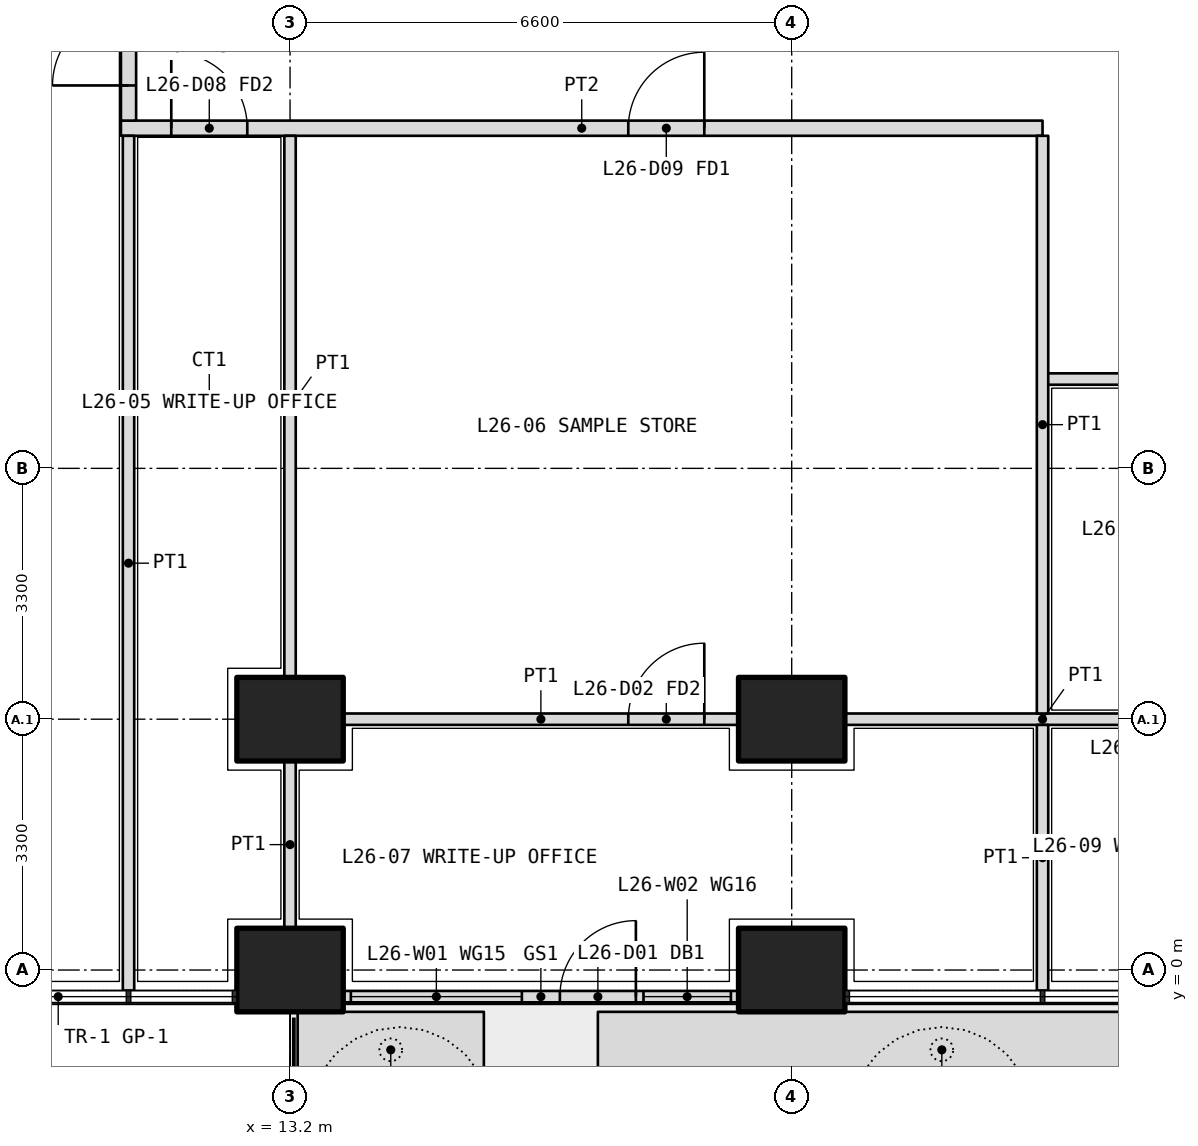
"""IFC4 building model, lengths in metres.
Left out: names, types, materials, properties, quantities, classifications, styles, units other than length and angle.
Written with IfcOpenShell. Run it as: python <this file> out.ifc"""

import sys

from ifc_helpers import new_model, si_unit, direction, frame, frame_2d, origin, origin_2d, place, context, subcontext, project, spatial, polyline, rectangle, outline, extrude, element, fill, save


model = new_model("IFC4")
c1 = context("Model", 3, precision=1e-05, world=origin(), true_north=direction((0.0, 1.0)))
c2 = subcontext(c1, "Body", "Model", "MODEL_VIEW")
j1 = project(units=[si_unit("LENGTHUNIT", "METRE"), si_unit("PLANEANGLEUNIT", "RADIAN")], contexts=[c1])
p1 = place(None, origin())
s1 = spatial("IfcSite", under=j1, at=p1, CompositionType="ELEMENT")
p2 = place(p1, origin())
s2 = spatial("IfcBuilding", under=s1, at=p2, CompositionType="ELEMENT")
p3 = place(p2, frame((0.0, 0.0, 115.8)))
s3 = spatial("IfcBuildingStorey", under=s2, at=p3, CompositionType="ELEMENT", Elevation=115.8)
for number, where, z_axis, x_axis in (
    (1, (13.2, 0.0, 0.0), (0.0, 0.0, 1.0), (1.0, 0.0, 0.0)),
    (2, (19.8, 0.0, 0.0), (0.0, 0.0, 1.0), (1.0, 0.0, 0.0)),
    (3, (13.2, 3.3, 0.0), (0.0, 0.0, 1.0), (1.0, 0.0, 0.0)),
    (4, (19.8, 3.3, 0.0), (0.0, 0.0, 1.0), (1.0, 0.0, 0.0)),
):
    element("IfcColumn", number, at=place(p3, frame(where, z_axis=z_axis, x_axis=x_axis)), inside=s3, PredefinedType="COLUMN", context=c2, shape_type="SweptSolid", body=[
        extrude(rectangle(XDim=1.4, YDim=1.1, at=origin_2d()), origin(), (0.0, 0.0, 1.0), 4.2),
    ])
p4 = place(p3, origin())
e5 = element("IfcWall", 5, at=p4, inside=s3, PredefinedType="USERDEFINED", context=c2, shape_type="SweptSolid", body=[
    extrude(outline(polyline([(13.3, -1.55), (15.75, -1.55), (15.75, -0.55), (13.3, -0.55), (13.3, -1.55)]), holes=[polyline([(13.45, -1.4), (15.6, -1.4), (15.6, -0.7), (13.45, -0.7), (13.45, -1.4)])]), origin(), (0.0, 0.0, 1.0), 1.05),
])
p5 = place(p3, origin())
e6 = element("IfcWall", 6, at=p5, inside=s3, PredefinedType="USERDEFINED", context=c2, shape_type="SweptSolid", body=[
    extrude(outline(polyline([(17.25, -1.55), (26.3, -1.55), (26.3, -0.55), (17.25, -0.55), (17.25, -1.55)]), holes=[polyline([(17.4, -1.4), (26.15, -1.4), (26.15, -0.7), (17.4, -0.7), (17.4, -1.4)])]), origin(), (0.0, 0.0, 1.0), 1.05),
])
p6 = place(p3, frame((13.9, -0.35, 0.0), z_axis=(0.0, 0.0, 1.0), x_axis=(1.0, 0.0, 0.0)))
e7 = element("IfcWall", 7, at=p6, inside=s3, PredefinedType="SOLIDWALL", context=c2, shape_type="SweptSolid", body=[
    extrude(rectangle(XDim=5.2, YDim=0.15, at=frame_2d((2.6, 0.0))), origin(), (0.0, 0.0, 1.0), 2.7),
])
p7 = place(p6, frame((2.85, 0.0, 0.0)))
e8 = element("IfcOpeningElement", 8, at=p7, cuts=e7, PredefinedType="OPENING", context=c2, shape_type="SweptSolid", body=[
    extrude(rectangle(XDim=1.0, YDim=2.4, at=frame_2d((0.5, 1.2))), frame((0.0, 0.085, 0.0), z_axis=(0.0, -1.0, 0.0), x_axis=(1.0, 0.0, 0.0)), (0.0, 0.0, 1.0), 0.17),
])
p8 = place(p6, frame((0.1, 0.0, 0.1)))
e9 = element("IfcOpeningElement", 9, at=p8, cuts=e7, PredefinedType="OPENING", context=c2, shape_type="SweptSolid", body=[
    extrude(rectangle(XDim=2.25, YDim=2.3, at=frame_2d((1.125, 1.15))), frame((0.0, 0.085, 0.0), z_axis=(0.0, -1.0, 0.0), x_axis=(1.0, 0.0, 0.0)), (0.0, 0.0, 1.0), 0.17),
])
p9 = place(p6, frame((3.95, 0.0, 0.1)))
e10 = element("IfcOpeningElement", 10, at=p9, cuts=e7, PredefinedType="OPENING", context=c2, shape_type="SweptSolid", body=[
    extrude(rectangle(XDim=1.15, YDim=2.3, at=frame_2d((0.575, 1.15))), frame((0.0, 0.085, 0.0), z_axis=(0.0, -1.0, 0.0), x_axis=(1.0, 0.0, 0.0)), (0.0, 0.0, 1.0), 0.17),
])
p10 = place(p3, frame((10.975, 11.075, 0.0), z_axis=(0.0, 0.0, 1.0), x_axis=(1.0, 0.0, 0.0)))
e11 = element("IfcWall", 11, at=p10, inside=s3, PredefinedType="PARTITIONING", context=c2, shape_type="SweptSolid", body=[
    extrude(rectangle(XDim=12.125, YDim=0.2, at=frame_2d((6.062, 0.0))), origin(), (0.0, 0.0, 1.0), 2.85),
])
p11 = place(p10, frame((0.663, 0.0, 0.0)))
e12 = element("IfcOpeningElement", 12, at=p11, cuts=e11, PredefinedType="OPENING", context=c2, shape_type="SweptSolid", body=[
    extrude(rectangle(XDim=1.0, YDim=2.1, at=frame_2d((0.5, 1.05))), frame((0.0, 0.11, 0.0), z_axis=(0.0, -1.0, 0.0), x_axis=(1.0, 0.0, 0.0)), (0.0, 0.0, 1.0), 0.22),
])
p12 = place(p10, frame((6.675, 0.0, 0.0)))
e13 = element("IfcOpeningElement", 13, at=p12, cuts=e11, PredefinedType="OPENING", context=c2, shape_type="SweptSolid", body=[
    extrude(rectangle(XDim=1.0, YDim=2.1, at=frame_2d((0.5, 1.05))), frame((0.0, 0.11, 0.0), z_axis=(0.0, -1.0, 0.0), x_axis=(1.0, 0.0, 0.0)), (0.0, 0.0, 1.0), 0.22),
])
p13 = place(p3, frame((11.075, 11.175, 0.0), z_axis=(0.0, 0.0, 1.0), x_axis=(0.0, 1.0, 0.0)))
e14 = element("IfcWall", 14, at=p13, inside=s3, PredefinedType="PARTITIONING", context=c2, shape_type="SweptSolid", body=[
    extrude(rectangle(XDim=27.625, YDim=0.2, at=frame_2d((13.812, 0.0))), origin(), (0.0, 0.0, 1.0), 2.85),
])
p14 = place(p13, frame((0.462, 0.0, 0.0)))
e15 = element("IfcOpeningElement", 15, at=p14, cuts=e14, PredefinedType="OPENING", context=c2, shape_type="SweptSolid", body=[
    extrude(rectangle(XDim=1.0, YDim=2.1, at=frame_2d((0.5, 1.05))), frame((0.0, 0.11, 0.0), z_axis=(0.0, -1.0, 0.0), x_axis=(1.0, 0.0, 0.0)), (0.0, 0.0, 1.0), 0.22),
])
p15 = place(p13, frame((2.575, 0.0, 0.0)))
e16 = element("IfcOpeningElement", 16, at=p15, cuts=e14, PredefinedType="OPENING", context=c2, shape_type="SweptSolid", body=[
    extrude(rectangle(XDim=1.0, YDim=2.1, at=frame_2d((0.5, 1.05))), frame((0.0, 0.11, 0.0), z_axis=(0.0, -1.0, 0.0), x_axis=(1.0, 0.0, 0.0)), (0.0, 0.0, 1.0), 0.22),
])
p16 = place(p13, frame((5.625, 0.0, 0.0)))
e17 = element("IfcOpeningElement", 17, at=p16, cuts=e14, PredefinedType="OPENING", context=c2, shape_type="SweptSolid", body=[
    extrude(rectangle(XDim=0.9, YDim=2.1, at=frame_2d((0.45, 1.05))), frame((0.0, 0.11, 0.0), z_axis=(0.0, -1.0, 0.0), x_axis=(1.0, 0.0, 0.0)), (0.0, 0.0, 1.0), 0.22),
])
p17 = place(p13, frame((9.425, 0.0, 0.0)))
e18 = element("IfcOpeningElement", 18, at=p17, cuts=e14, PredefinedType="OPENING", context=c2, shape_type="SweptSolid", body=[
    extrude(rectangle(XDim=0.9, YDim=2.1, at=frame_2d((0.45, 1.05))), frame((0.0, 0.11, 0.0), z_axis=(0.0, -1.0, 0.0), x_axis=(1.0, 0.0, 0.0)), (0.0, 0.0, 1.0), 0.22),
])
p18 = place(p13, frame((12.975, 0.0, 0.0)))
e19 = element("IfcOpeningElement", 19, at=p18, cuts=e14, PredefinedType="OPENING", context=c2, shape_type="SweptSolid", body=[
    extrude(rectangle(XDim=1.0, YDim=2.1, at=frame_2d((0.5, 1.05))), frame((0.0, 0.11, 0.0), z_axis=(0.0, -1.0, 0.0), x_axis=(1.0, 0.0, 0.0)), (0.0, 0.0, 1.0), 0.22),
])
p19 = place(p13, frame((19.675, 0.0, 0.0)))
e20 = element("IfcOpeningElement", 20, at=p19, cuts=e14, PredefinedType="OPENING", context=c2, shape_type="SweptSolid", body=[
    extrude(rectangle(XDim=1.0, YDim=2.1, at=frame_2d((0.5, 1.05))), frame((0.0, 0.11, 0.0), z_axis=(0.0, -1.0, 0.0), x_axis=(1.0, 0.0, 0.0)), (0.0, 0.0, 1.0), 0.22),
])
p20 = place(p13, frame((25.925, 0.0, 0.0)))
e21 = element("IfcOpeningElement", 21, at=p20, cuts=e14, PredefinedType="OPENING", context=c2, shape_type="SweptSolid", body=[
    extrude(rectangle(XDim=1.0, YDim=2.1, at=frame_2d((0.5, 1.05))), frame((0.0, 0.11, 0.0), z_axis=(0.0, -1.0, 0.0), x_axis=(1.0, 0.0, 0.0)), (0.0, 0.0, 1.0), 0.22),
])
p21 = place(p3, frame((11.075, -0.27, 0.0), z_axis=(0.0, 0.0, 1.0), x_axis=(0.0, 1.0, 0.0)))
e22 = element("IfcWall", 22, at=p21, inside=s3, PredefinedType="PARTITIONING", context=c2, shape_type="SweptSolid", body=[
    extrude(rectangle(XDim=11.245, YDim=0.15, at=frame_2d((5.623, 0.0))), origin(), (0.0, 0.0, 1.0), 2.7),
])
p22 = place(p3, frame((13.9, 3.3, 0.0), z_axis=(0.0, 0.0, 1.0), x_axis=(1.0, 0.0, 0.0)))
e23 = element("IfcWall", 23, at=p22, inside=s3, PredefinedType="PARTITIONING", context=c2, shape_type="SweptSolid", body=[
    extrude(rectangle(XDim=5.2, YDim=0.15, at=frame_2d((2.6, 0.0))), origin(), (0.0, 0.0, 1.0), 3.9),
])
p23 = place(p22, frame((3.75, 0.0, 0.0)))
e24 = element("IfcOpeningElement", 24, at=p23, cuts=e23, PredefinedType="OPENING", context=c2, shape_type="SweptSolid", body=[
    extrude(rectangle(XDim=1.0, YDim=2.1, at=frame_2d((0.5, 1.05))), frame((0.0, 0.085, 0.0), z_axis=(0.0, -1.0, 0.0), x_axis=(1.0, 0.0, 0.0)), (0.0, 0.0, 1.0), 0.17),
])
p24 = place(p3, frame((20.5, 3.3, 0.0), z_axis=(0.0, 0.0, 1.0), x_axis=(1.0, 0.0, 0.0)))
e25 = element("IfcWall", 25, at=p24, inside=s3, PredefinedType="PARTITIONING", context=c2, shape_type="SweptSolid", body=[
    extrude(rectangle(XDim=5.2, YDim=0.15, at=frame_2d((2.6, 0.0))), origin(), (0.0, 0.0, 1.0), 3.9),
])
p25 = place(p24, frame((3.95, 0.0, 0.0)))
e26 = element("IfcOpeningElement", 26, at=p25, cuts=e25, PredefinedType="OPENING", context=c2, shape_type="SweptSolid", body=[
    extrude(rectangle(XDim=1.0, YDim=2.1, at=frame_2d((0.5, 1.05))), frame((0.0, 0.085, 0.0), z_axis=(0.0, -1.0, 0.0), x_axis=(1.0, 0.0, 0.0)), (0.0, 0.0, 1.0), 0.17),
])
p26 = place(p3, frame((23.1, 7.775, 0.0), z_axis=(0.0, 0.0, 1.0), x_axis=(1.0, 0.0, 0.0)))
e27 = element("IfcWall", 27, at=p26, inside=s3, PredefinedType="PARTITIONING", context=c2, shape_type="SweptSolid", body=[
    extrude(rectangle(XDim=6.6, YDim=0.15, at=frame_2d((3.3, 0.0))), origin(), (0.0, 0.0, 1.0), 2.85),
])
p27 = place(p26, frame((2.7, 0.0, 0.0)))
e28 = element("IfcOpeningElement", 28, at=p27, cuts=e27, PredefinedType="OPENING", context=c2, shape_type="SweptSolid", body=[
    extrude(rectangle(XDim=1.2, YDim=2.1, at=frame_2d((0.6, 1.05))), frame((0.0, 0.085, 0.0), z_axis=(0.0, -1.0, 0.0), x_axis=(1.0, 0.0, 0.0)), (0.0, 0.0, 1.0), 0.17),
])
p28 = place(p3, frame((13.2, 0.55, 0.0), z_axis=(0.0, 0.0, 1.0), x_axis=(0.0, 1.0, 0.0)))
e29 = element("IfcWall", 29, at=p28, inside=s3, PredefinedType="PARTITIONING", context=c2, shape_type="SweptSolid", body=[
    extrude(rectangle(XDim=2.2, YDim=0.15, at=frame_2d((1.1, 0.0))), origin(), (0.0, 0.0, 1.0), 2.85),
])
p29 = place(p3, frame((13.2, 3.85, 0.0), z_axis=(0.0, 0.0, 1.0), x_axis=(0.0, 1.0, 0.0)))
e30 = element("IfcWall", 30, at=p29, inside=s3, PredefinedType="PARTITIONING", context=c2, shape_type="SweptSolid", body=[
    extrude(rectangle(XDim=7.125, YDim=0.15, at=frame_2d((3.562, 0.0))), origin(), (0.0, 0.0, 1.0), 2.85),
])
p30 = place(p3, frame((23.1, -0.27, 0.0), z_axis=(0.0, 0.0, 1.0), x_axis=(0.0, 1.0, 0.0)))
e31 = element("IfcWall", 31, at=p30, inside=s3, PredefinedType="PARTITIONING", context=c2, shape_type="SweptSolid", body=[
    extrude(rectangle(XDim=3.495, YDim=0.15, at=frame_2d((1.748, 0.0))), origin(), (0.0, 0.0, 1.0), 2.7),
])
p31 = place(p3, frame((23.1, 3.375, 0.0), z_axis=(0.0, 0.0, 1.0), x_axis=(0.0, 1.0, 0.0)))
e32 = element("IfcWall", 32, at=p31, inside=s3, PredefinedType="PARTITIONING", context=c2, shape_type="SweptSolid", body=[
    extrude(rectangle(XDim=7.6, YDim=0.15, at=frame_2d((3.8, 0.0))), origin(), (0.0, 0.0, 1.0), 3.9),
])
p32 = place(p7, origin())
e33 = element("IfcDoor", 33, at=p32, inside=s3, OperationType="SINGLE_SWING_RIGHT", PredefinedType="DOOR", context=c2, shape_type="SweptSolid", body=[
    extrude(rectangle(XDim=1.0, YDim=2.4, at=frame_2d((0.5, 1.2))), frame((0.0, 0.025, 0.0), z_axis=(0.0, -1.0, 0.0), x_axis=(1.0, 0.0, 0.0)), (0.0, 0.0, 1.0), 0.05),
])
fill(e8, e33)
p33 = place(p8, origin())
e34 = element("IfcWindow", 34, at=p33, inside=s3, PartitioningType="SINGLE_PANEL", PredefinedType="WINDOW", context=c2, shape_type="SweptSolid", body=[
    extrude(rectangle(XDim=2.25, YDim=2.3, at=frame_2d((1.125, 1.15))), frame((0.0, 0.03, 0.0), z_axis=(0.0, -1.0, 0.0), x_axis=(1.0, 0.0, 0.0)), (0.0, 0.0, 1.0), 0.06),
])
fill(e9, e34)
p34 = place(p9, origin())
e35 = element("IfcWindow", 35, at=p34, inside=s3, PartitioningType="SINGLE_PANEL", PredefinedType="WINDOW", context=c2, shape_type="SweptSolid", body=[
    extrude(rectangle(XDim=1.15, YDim=2.3, at=frame_2d((0.575, 1.15))), frame((0.0, 0.03, 0.0), z_axis=(0.0, -1.0, 0.0), x_axis=(1.0, 0.0, 0.0)), (0.0, 0.0, 1.0), 0.06),
])
fill(e10, e35)
p35 = place(p11, origin())
e36 = element("IfcDoor", 36, at=p35, inside=s3, OperationType="SINGLE_SWING_LEFT", PredefinedType="DOOR", context=c2, shape_type="SweptSolid", body=[
    extrude(rectangle(XDim=1.0, YDim=2.1, at=frame_2d((0.5, 1.05))), frame((0.0, 0.025, 0.0), z_axis=(0.0, -1.0, 0.0), x_axis=(1.0, 0.0, 0.0)), (0.0, 0.0, 1.0), 0.05),
])
fill(e12, e36)
p36 = place(p12, origin())
e37 = element("IfcDoor", 37, at=p36, inside=s3, OperationType="SINGLE_SWING_RIGHT", PredefinedType="DOOR", context=c2, shape_type="SweptSolid", body=[
    extrude(rectangle(XDim=1.0, YDim=2.1, at=frame_2d((0.5, 1.05))), frame((0.0, 0.025, 0.0), z_axis=(0.0, -1.0, 0.0), x_axis=(1.0, 0.0, 0.0)), (0.0, 0.0, 1.0), 0.05),
])
fill(e13, e37)
p37 = place(p23, origin())
e38 = element("IfcDoor", 38, at=p37, inside=s3, OperationType="SINGLE_SWING_RIGHT", PredefinedType="DOOR", context=c2, shape_type="SweptSolid", body=[
    extrude(rectangle(XDim=1.0, YDim=2.1, at=frame_2d((0.5, 1.05))), frame((0.0, 0.025, 0.0), z_axis=(0.0, -1.0, 0.0), x_axis=(1.0, 0.0, 0.0)), (0.0, 0.0, 1.0), 0.05),
])
fill(e24, e38)
p38 = place(p14, origin())
e39 = element("IfcDoor", 39, at=p38, inside=s3, OperationType="SINGLE_SWING_LEFT", PredefinedType="DOOR", context=c2, shape_type="SweptSolid", body=[
    extrude(rectangle(XDim=1.0, YDim=2.1, at=frame_2d((0.5, 1.05))), frame((0.0, 0.025, 0.0), z_axis=(0.0, -1.0, 0.0), x_axis=(1.0, 0.0, 0.0)), (0.0, 0.0, 1.0), 0.05),
])
fill(e15, e39)
save(model, sys.argv[1])
